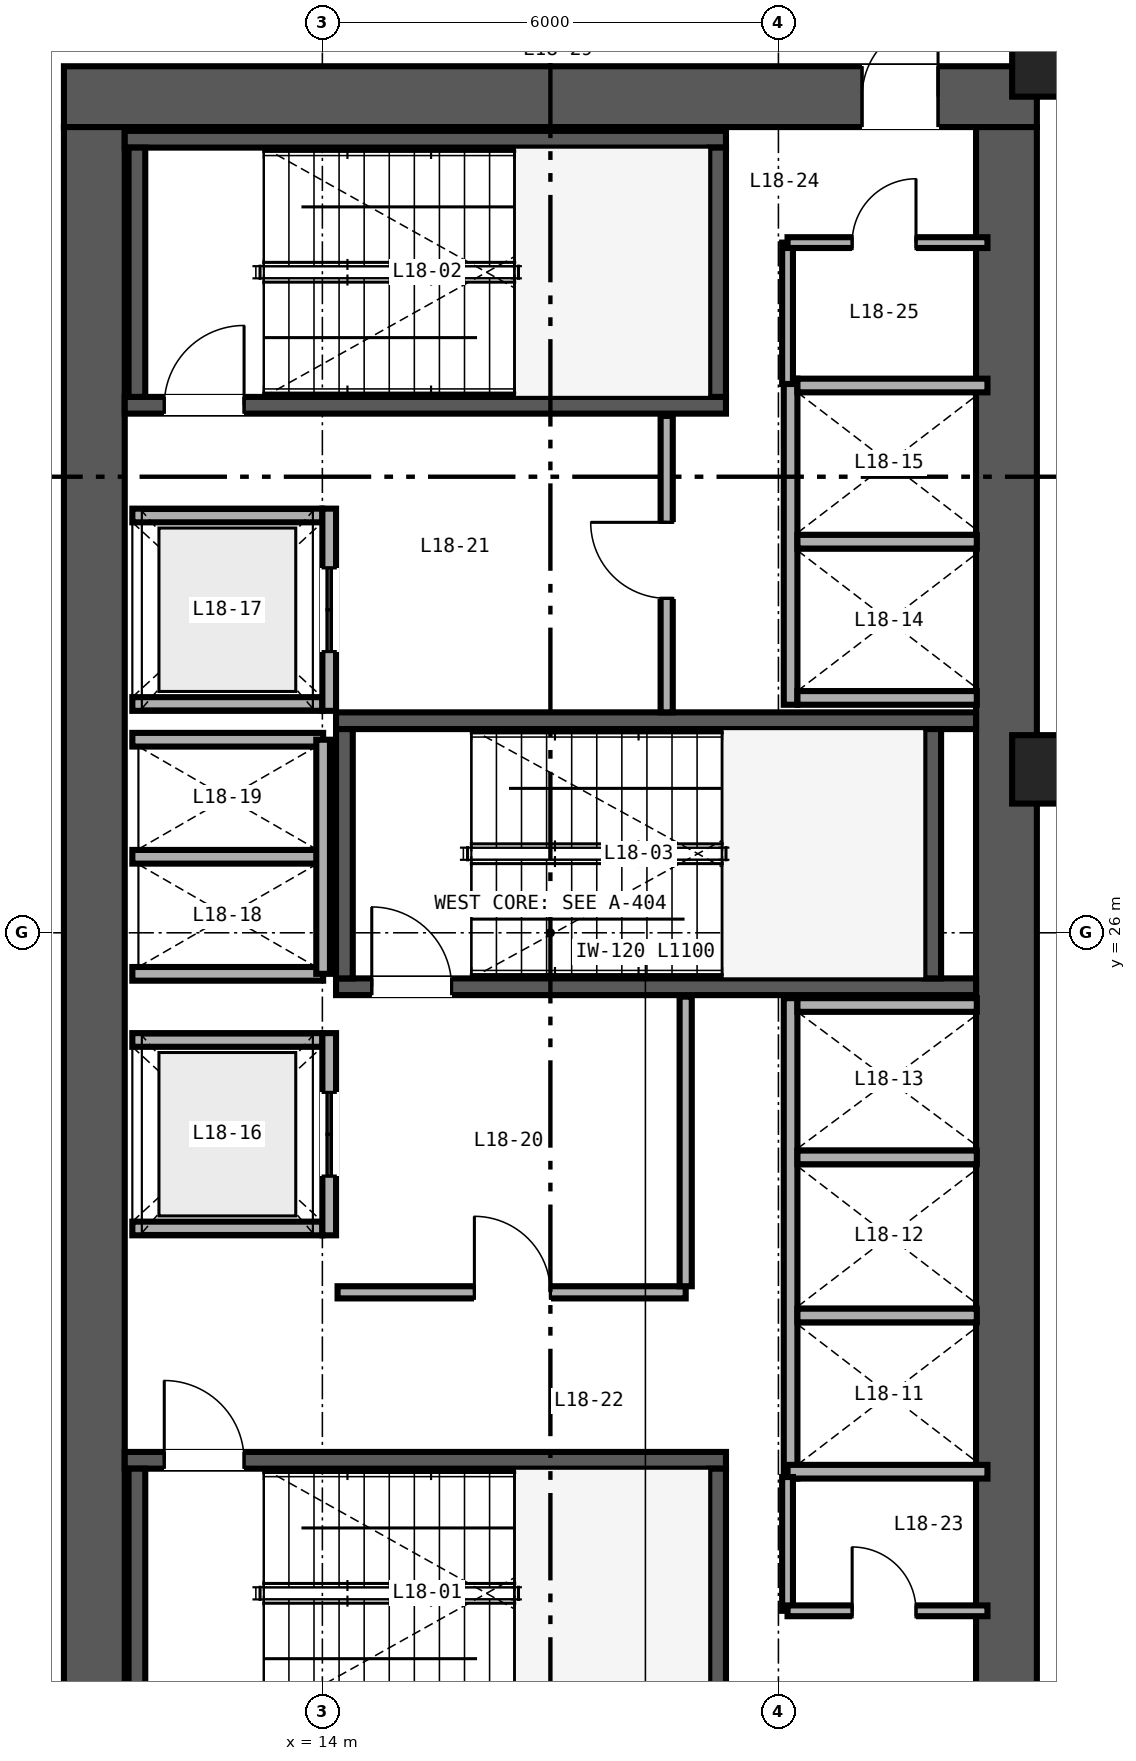
"""IFC4 building model, lengths in metres.
Left out: names, types, materials, properties, quantities, classifications, styles, units other than length and angle.
Written with IfcOpenShell. Run it as: python <this file> out.ifc"""

import sys

from ifc_helpers import new_model, si_unit, direction, frame, frame_2d, origin, origin_2d, place, context, subcontext, project, spatial, rectangle, hollow_rectangle, extrude, source, transform, mapped, element, fill, save


model = new_model("IFC4")
c1 = context("Model", 3, precision=1e-05, world=origin(), true_north=direction((0.0, 1.0)))
c2 = subcontext(c1, "Body", "Model", "MODEL_VIEW")
j1 = project(units=[si_unit("LENGTHUNIT", "METRE"), si_unit("PLANEANGLEUNIT", "RADIAN")], contexts=[c1])
p1 = place(None, origin())
s1 = spatial("IfcSite", under=j1, at=p1, CompositionType="ELEMENT")
p2 = place(p1, origin())
s2 = spatial("IfcBuilding", under=s1, at=p2, CompositionType="ELEMENT")
p3 = place(p2, frame((0.0, 0.0, 74.4)))
s3 = spatial("IfcBuildingStorey", under=s2, at=p3, CompositionType="ELEMENT", Elevation=74.4)
p4 = place(p3, frame((10.6, 37.0, 0.0), z_axis=(0.0, 0.0, 1.0), x_axis=(1.0, 0.0, 0.0)))
e1 = element("IfcWall", 1, at=p4, inside=s3, PredefinedType="SHEAR", context=c2, shape_type="SweptSolid", body=[
    extrude(rectangle(XDim=12.8, YDim=0.8, at=frame_2d((6.4, 0.0))), origin(), (0.0, 0.0, 1.0), 3.35),
])
p5 = place(p4, frame((10.5, 0.0, 0.0)))
e2 = element("IfcOpeningElement", 2, at=p5, cuts=e1, PredefinedType="OPENING", context=c2, shape_type="SweptSolid", body=[
    extrude(rectangle(XDim=1.0, YDim=2.15, at=frame_2d((0.5, 1.075))), frame((0.0, 0.41, 0.0), z_axis=(0.0, -1.0, 0.0), x_axis=(1.0, 0.0, 0.0)), (0.0, 0.0, 1.0), 0.82),
])
for number, where, z_axis, x_axis in (
    (3, (11.0, 15.4, 0.0), (0.0, 0.0, 1.0), (0.0, 1.0, 0.0)),
    (4, (23.0, 15.4, 0.0), (0.0, 0.0, 1.0), (0.0, 1.0, 0.0)),
):
    element("IfcWall", number, at=place(p3, frame(where, z_axis=z_axis, x_axis=x_axis)), inside=s3, PredefinedType="SHEAR", context=c2, shape_type="SweptSolid", body=[
        extrude(rectangle(XDim=21.2, YDim=0.8, at=frame_2d((10.6, 0.0))), origin(), (0.0, 0.0, 1.0), 3.35),
    ])
p6 = place(p3, frame((11.4, 19.06, 0.0), z_axis=(0.0, 0.0, 1.0), x_axis=(1.0, 0.0, 0.0)))
e5 = element("IfcWall", 5, at=p6, inside=s3, PredefinedType="SHEAR", context=c2, shape_type="SweptSolid", body=[
    extrude(rectangle(XDim=7.91, YDim=0.22, at=frame_2d((3.955, 0.0))), origin(), (0.0, 0.0, 1.0), 3.4),
])
p7 = place(p6, frame((0.52, 0.0, 0.0)))
e6 = element("IfcOpeningElement", 6, at=p7, cuts=e5, PredefinedType="OPENING", context=c2, shape_type="SweptSolid", body=[
    extrude(rectangle(XDim=1.05, YDim=2.15, at=frame_2d((0.525, 1.075))), frame((0.0, 0.12, 0.0), z_axis=(0.0, -1.0, 0.0), x_axis=(1.0, 0.0, 0.0)), (0.0, 0.0, 1.0), 0.24),
])
for number, where, z_axis, x_axis in (
    (7, (11.56, 15.67, 0.0), (0.0, 0.0, 1.0), (0.0, 1.0, 0.0)),
    (8, (19.2, 15.67, 0.0), (0.0, 0.0, 1.0), (0.0, 1.0, 0.0)),
):
    element("IfcWall", number, at=place(p3, frame(where, z_axis=z_axis, x_axis=x_axis)), inside=s3, PredefinedType="SHEAR", context=c2, shape_type="SweptSolid", body=[
        extrude(rectangle(XDim=3.28, YDim=0.22, at=frame_2d((1.64, 0.0))), origin(), (0.0, 0.0, 1.0), 3.4),
    ])
p8 = place(p3, frame((11.4, 32.94, 0.0), z_axis=(0.0, 0.0, 1.0), x_axis=(1.0, 0.0, 0.0)))
e9 = element("IfcWall", 9, at=p8, inside=s3, PredefinedType="SHEAR", context=c2, shape_type="SweptSolid", body=[
    extrude(rectangle(XDim=7.91, YDim=0.22, at=frame_2d((3.955, 0.0))), origin(), (0.0, 0.0, 1.0), 3.4),
])
p9 = place(p8, frame((0.52, 0.0, 0.0)))
e10 = element("IfcOpeningElement", 10, at=p9, cuts=e9, PredefinedType="OPENING", context=c2, shape_type="SweptSolid", body=[
    extrude(rectangle(XDim=1.05, YDim=2.15, at=frame_2d((0.525, 1.075))), frame((0.0, 0.12, 0.0), z_axis=(0.0, -1.0, 0.0), x_axis=(1.0, 0.0, 0.0)), (0.0, 0.0, 1.0), 0.24),
])
p10 = place(p3, frame((11.4, 36.44, 0.0), z_axis=(0.0, 0.0, 1.0), x_axis=(1.0, 0.0, 0.0)))
e11 = element("IfcWall", 11, at=p10, inside=s3, PredefinedType="SHEAR", context=c2, shape_type="SweptSolid", body=[
    extrude(rectangle(XDim=7.91, YDim=0.22, at=frame_2d((3.955, 0.0))), origin(), (0.0, 0.0, 1.0), 3.4),
])
for number, where, z_axis, x_axis in (
    (12, (11.56, 33.05, 0.0), (0.0, 0.0, 1.0), (0.0, 1.0, 0.0)),
    (13, (19.2, 33.05, 0.0), (0.0, 0.0, 1.0), (0.0, 1.0, 0.0)),
):
    element("IfcWall", number, at=place(p3, frame(where, z_axis=z_axis, x_axis=x_axis)), inside=s3, PredefinedType="SHEAR", context=c2, shape_type="SweptSolid", body=[
        extrude(rectangle(XDim=3.28, YDim=0.22, at=frame_2d((1.64, 0.0))), origin(), (0.0, 0.0, 1.0), 3.4),
    ])
p11 = place(p3, frame((14.18, 25.29, 0.0), z_axis=(0.0, 0.0, 1.0), x_axis=(1.0, 0.0, 0.0)))
e14 = element("IfcWall", 14, at=p11, inside=s3, PredefinedType="SHEAR", context=c2, shape_type="SweptSolid", body=[
    extrude(rectangle(XDim=8.42, YDim=0.22, at=frame_2d((4.21, 0.0))), origin(), (0.0, 0.0, 1.0), 3.4),
])
p12 = place(p11, frame((0.47, 0.0, 0.0)))
e15 = element("IfcOpeningElement", 15, at=p12, cuts=e14, PredefinedType="OPENING", context=c2, shape_type="SweptSolid", body=[
    extrude(rectangle(XDim=1.05, YDim=2.15, at=frame_2d((0.525, 1.075))), frame((0.0, 0.12, 0.0), z_axis=(0.0, -1.0, 0.0), x_axis=(1.0, 0.0, 0.0)), (0.0, 0.0, 1.0), 0.24),
])
p13 = place(p3, frame((14.18, 28.79, 0.0), z_axis=(0.0, 0.0, 1.0), x_axis=(1.0, 0.0, 0.0)))
e16 = element("IfcWall", 16, at=p13, inside=s3, PredefinedType="SHEAR", context=c2, shape_type="SweptSolid", body=[
    extrude(rectangle(XDim=8.42, YDim=0.22, at=frame_2d((4.21, 0.0))), origin(), (0.0, 0.0, 1.0), 3.4),
])
for number, where, z_axis, x_axis in (
    (17, (14.29, 25.4, 0.0), (0.0, 0.0, 1.0), (0.0, 1.0, 0.0)),
    (18, (22.03, 25.4, 0.0), (0.0, 0.0, 1.0), (0.0, 1.0, 0.0)),
):
    element("IfcWall", number, at=place(p3, frame(where, z_axis=z_axis, x_axis=x_axis)), inside=s3, PredefinedType="SHEAR", context=c2, shape_type="SweptSolid", body=[
        extrude(rectangle(XDim=3.28, YDim=0.22, at=frame_2d((1.64, 0.0))), origin(), (0.0, 0.0, 1.0), 3.4),
    ])
m1 = source(origin(), c2, "Body", "SweptSolid", [
    extrude(hollow_rectangle(XDim=0.85, YDim=0.9, WallThickness=0.04, at=origin_2d()), origin(), (0.0, 0.0, 1.0), 3.35),
])
for number, where, z_axis, x_axis in (
    (19, (23.5, 28.15, 0.0), (0.0, 0.0, 1.0), (1.0, 0.0, 0.0)),
    (20, (23.5, 37.45, 0.0), (0.0, 0.0, 1.0), (1.0, 0.0, 0.0)),
):
    element("IfcColumn", number, at=place(p3, frame(where, z_axis=z_axis, x_axis=x_axis)), inside=s3, PredefinedType="COLUMN", context=c2, shape_type="MappedRepresentation", body=[
        mapped(m1, transform((0.0, 0.0, 0.0), scale=1.0)),
    ])
p14 = place(p3, frame((20.16, 18.82, 0.0), z_axis=(0.0, 0.0, 1.0), x_axis=(0.0, 1.0, 0.0)))
e21 = element("IfcWall", 21, at=p14, inside=s3, PredefinedType="SOLIDWALL", context=c2, shape_type="SweptSolid", body=[
    extrude(rectangle(XDim=6.32, YDim=0.18, at=frame_2d((3.16, 0.0))), origin(), (0.0, 0.0, 1.0), 2.36),
])
p15 = place(p3, frame((20.12, 18.91, 0.0), z_axis=(0.0, 0.0, 1.0), x_axis=(1.0, 0.0, 0.0)))
e22 = element("IfcWall", 22, at=p15, inside=s3, PredefinedType="SOLIDWALL", context=c2, shape_type="SweptSolid", body=[
    extrude(rectangle(XDim=2.63, YDim=0.18, at=frame_2d((1.315, 0.0))), origin(), (0.0, 0.0, 1.0), 3.35),
])
p16 = place(p3, frame((20.25, 25.05, 0.0), z_axis=(0.0, 0.0, 1.0), x_axis=(1.0, 0.0, 0.0)))
e23 = element("IfcWall", 23, at=p16, inside=s3, PredefinedType="SOLIDWALL", context=c2, shape_type="SweptSolid", body=[
    extrude(rectangle(XDim=2.36, YDim=0.18, at=frame_2d((1.18, 0.0))), origin(), (0.0, 0.0, 1.0), 3.35),
])
p17 = place(p3, frame((20.25, 20.965, 0.0), z_axis=(0.0, 0.0, 1.0), x_axis=(1.0, 0.0, 0.0)))
e24 = element("IfcWall", 24, at=p17, inside=s3, PredefinedType="SOLIDWALL", context=c2, shape_type="SweptSolid", body=[
    extrude(rectangle(XDim=2.36, YDim=0.18, at=frame_2d((1.18, 0.0))), origin(), (0.0, 0.0, 1.0), 2.36),
])
p18 = place(p3, frame((20.25, 23.045, 0.0), z_axis=(0.0, 0.0, 1.0), x_axis=(1.0, 0.0, 0.0)))
e25 = element("IfcWall", 25, at=p18, inside=s3, PredefinedType="SOLIDWALL", context=c2, shape_type="SweptSolid", body=[
    extrude(rectangle(XDim=2.36, YDim=0.18, at=frame_2d((1.18, 0.0))), origin(), (0.0, 0.0, 1.0), 3.35),
])
p19 = place(p3, frame((20.16, 29.0, 0.0), z_axis=(0.0, 0.0, 1.0), x_axis=(0.0, 1.0, 0.0)))
e26 = element("IfcWall", 26, at=p19, inside=s3, PredefinedType="SOLIDWALL", context=c2, shape_type="SweptSolid", body=[
    extrude(rectangle(XDim=4.29, YDim=0.18, at=frame_2d((2.145, 0.0))), origin(), (0.0, 0.0, 1.0), 3.35),
])
p20 = place(p3, frame((20.25, 29.09, 0.0), z_axis=(0.0, 0.0, 1.0), x_axis=(1.0, 0.0, 0.0)))
e27 = element("IfcWall", 27, at=p20, inside=s3, PredefinedType="SOLIDWALL", context=c2, shape_type="SweptSolid", body=[
    extrude(rectangle(XDim=2.36, YDim=0.18, at=frame_2d((1.18, 0.0))), origin(), (0.0, 0.0, 1.0), 3.35),
])
p21 = place(p3, frame((20.25, 33.2, 0.0), z_axis=(0.0, 0.0, 1.0), x_axis=(1.0, 0.0, 0.0)))
e28 = element("IfcWall", 28, at=p21, inside=s3, PredefinedType="SOLIDWALL", context=c2, shape_type="SweptSolid", body=[
    extrude(rectangle(XDim=2.5, YDim=0.18, at=frame_2d((1.25, 0.0))), origin(), (0.0, 0.0, 1.0), 3.35),
])
p22 = place(p3, frame((20.25, 31.145, 0.0), z_axis=(0.0, 0.0, 1.0), x_axis=(1.0, 0.0, 0.0)))
e29 = element("IfcWall", 29, at=p22, inside=s3, PredefinedType="SOLIDWALL", context=c2, shape_type="SweptSolid", body=[
    extrude(rectangle(XDim=2.36, YDim=0.18, at=frame_2d((1.18, 0.0))), origin(), (0.0, 0.0, 1.0), 3.35),
])
for number, where, z_axis, x_axis in (
    (30, (11.5, 22.11, 0.0), (0.0, 0.0, 1.0), (1.0, 0.0, 0.0)),
    (31, (11.5, 24.59, 0.0), (0.0, 0.0, 1.0), (1.0, 0.0, 0.0)),
):
    element("IfcWall", number, at=place(p3, frame(where, z_axis=z_axis, x_axis=x_axis)), inside=s3, PredefinedType="SOLIDWALL", context=c2, shape_type="SweptSolid", body=[
        extrude(rectangle(XDim=2.5, YDim=0.18, at=frame_2d((1.25, 0.0))), origin(), (0.0, 0.0, 1.0), 3.35),
    ])
p23 = place(p3, frame((14.09, 22.02, 0.0), z_axis=(0.0, 0.0, 1.0), x_axis=(0.0, 1.0, 0.0)))
e32 = element("IfcWall", 32, at=p23, inside=s3, PredefinedType="SOLIDWALL", context=c2, shape_type="SweptSolid", body=[
    extrude(rectangle(XDim=2.66, YDim=0.18, at=frame_2d((1.33, 0.0))), origin(), (0.0, 0.0, 1.0), 3.35),
])
p24 = place(p23, frame((0.78, 0.0, 0.0)))
e33 = element("IfcOpeningElement", 33, at=p24, cuts=e32, PredefinedType="OPENING", context=c2, shape_type="SweptSolid", body=[
    extrude(rectangle(XDim=1.1, YDim=2.2, at=frame_2d((0.55, 1.1))), frame((0.0, 0.1, 0.0), z_axis=(0.0, -1.0, 0.0), x_axis=(1.0, 0.0, 0.0)), (0.0, 0.0, 1.0), 0.2),
])
for number, where, z_axis, x_axis in (
    (34, (11.5, 29.01, 0.0), (0.0, 0.0, 1.0), (1.0, 0.0, 0.0)),
    (35, (11.5, 31.49, 0.0), (0.0, 0.0, 1.0), (1.0, 0.0, 0.0)),
):
    element("IfcWall", number, at=place(p3, frame(where, z_axis=z_axis, x_axis=x_axis)), inside=s3, PredefinedType="SOLIDWALL", context=c2, shape_type="SweptSolid", body=[
        extrude(rectangle(XDim=2.5, YDim=0.18, at=frame_2d((1.25, 0.0))), origin(), (0.0, 0.0, 1.0), 3.35),
    ])
p25 = place(p3, frame((14.09, 28.92, 0.0), z_axis=(0.0, 0.0, 1.0), x_axis=(0.0, 1.0, 0.0)))
e36 = element("IfcWall", 36, at=p25, inside=s3, PredefinedType="SOLIDWALL", context=c2, shape_type="SweptSolid", body=[
    extrude(rectangle(XDim=2.66, YDim=0.18, at=frame_2d((1.33, 0.0))), origin(), (0.0, 0.0, 1.0), 3.35),
])
p26 = place(p25, frame((0.78, 0.0, 0.0)))
e37 = element("IfcOpeningElement", 37, at=p26, cuts=e36, PredefinedType="OPENING", context=c2, shape_type="SweptSolid", body=[
    extrude(rectangle(XDim=1.1, YDim=2.2, at=frame_2d((0.55, 1.1))), frame((0.0, 0.1, 0.0), z_axis=(0.0, -1.0, 0.0), x_axis=(1.0, 0.0, 0.0)), (0.0, 0.0, 1.0), 0.2),
])
for number, where, z_axis, x_axis in (
    (38, (11.5, 25.46, 0.0), (0.0, 0.0, 1.0), (1.0, 0.0, 0.0)),
    (39, (11.5, 27.0, 0.0), (0.0, 0.0, 1.0), (1.0, 0.0, 0.0)),
    (40, (11.5, 28.54, 0.0), (0.0, 0.0, 1.0), (1.0, 0.0, 0.0)),
):
    element("IfcWall", number, at=place(p3, frame(where, z_axis=z_axis, x_axis=x_axis)), inside=s3, PredefinedType="SOLIDWALL", context=c2, shape_type="SweptSolid", body=[
        extrude(rectangle(XDim=2.51, YDim=0.18, at=frame_2d((1.255, 0.0))), origin(), (0.0, 0.0, 1.0), 3.35),
    ])
p27 = place(p3, frame((14.01, 25.46, 0.0), z_axis=(0.0, 0.0, 1.0), x_axis=(0.0, 1.0, 0.0)))
e41 = element("IfcWall", 41, at=p27, inside=s3, PredefinedType="SOLIDWALL", context=c2, shape_type="SweptSolid", body=[
    extrude(rectangle(XDim=3.08, YDim=0.18, at=frame_2d((1.54, 0.0))), origin(), (0.0, 0.0, 1.0), 3.35),
])
p28 = place(p3, frame((14.2, 21.27, 0.0), z_axis=(0.0, 0.0, 1.0), x_axis=(1.0, 0.0, 0.0)))
e42 = element("IfcWall", 42, at=p28, inside=s3, PredefinedType="PARTITIONING", context=c2, shape_type="SweptSolid", body=[
    extrude(rectangle(XDim=4.58, YDim=0.16, at=frame_2d((2.29, 0.0))), origin(), (0.0, 0.0, 1.0), 3.35),
])
p29 = place(p28, frame((1.8, 0.0, 0.0)))
e43 = element("IfcOpeningElement", 43, at=p29, cuts=e42, PredefinedType="OPENING", context=c2, shape_type="SweptSolid", body=[
    extrude(rectangle(XDim=1.0, YDim=2.15, at=frame_2d((0.5, 1.075))), frame((0.0, 0.09, 0.0), z_axis=(0.0, -1.0, 0.0), x_axis=(1.0, 0.0, 0.0)), (0.0, 0.0, 1.0), 0.18),
])
p30 = place(p3, frame((18.78, 21.35, 0.0), z_axis=(0.0, 0.0, 1.0), x_axis=(0.0, 1.0, 0.0)))
e44 = element("IfcWall", 44, at=p30, inside=s3, PredefinedType="PARTITIONING", context=c2, shape_type="SweptSolid", body=[
    extrude(rectangle(XDim=3.81, YDim=0.16, at=frame_2d((1.905, 0.0))), origin(), (0.0, 0.0, 1.0), 3.35),
])
p31 = place(p3, frame((18.53, 28.9, 0.0), z_axis=(0.0, 0.0, 1.0), x_axis=(0.0, 1.0, 0.0)))
e45 = element("IfcWall", 45, at=p31, inside=s3, PredefinedType="PARTITIONING", context=c2, shape_type="SweptSolid", body=[
    extrude(rectangle(XDim=3.9, YDim=0.16, at=frame_2d((1.95, 0.0))), origin(), (0.0, 0.0, 1.0), 3.35),
])
p32 = place(p31, frame((1.5, 0.0, 0.0)))
e46 = element("IfcOpeningElement", 46, at=p32, cuts=e45, PredefinedType="OPENING", context=c2, shape_type="SweptSolid", body=[
    extrude(rectangle(XDim=1.0, YDim=2.15, at=frame_2d((0.5, 1.075))), frame((0.0, 0.09, 0.0), z_axis=(0.0, -1.0, 0.0), x_axis=(1.0, 0.0, 0.0)), (0.0, 0.0, 1.0), 0.18),
])
p33 = place(p3, frame((20.12, 17.08, 0.0), z_axis=(0.0, 0.0, 1.0), x_axis=(0.0, 1.0, 0.0)))
e47 = element("IfcWall", 47, at=p33, inside=s3, PredefinedType="PARTITIONING", context=c2, shape_type="SweptSolid", body=[
    extrude(rectangle(XDim=1.76, YDim=0.142, at=frame_2d((0.88, 0.0))), origin(), (0.0, 0.0, 1.0), 3.35),
])
p34 = place(p3, frame((20.12, 17.08, 0.0), z_axis=(0.0, 0.0, 1.0), x_axis=(1.0, 0.0, 0.0)))
e48 = element("IfcWall", 48, at=p34, inside=s3, PredefinedType="PARTITIONING", context=c2, shape_type="SweptSolid", body=[
    extrude(rectangle(XDim=2.63, YDim=0.142, at=frame_2d((1.315, 0.0))), origin(), (0.0, 0.0, 1.0), 3.35),
])
p35 = place(p34, frame((0.85, 0.0, 0.0)))
e49 = element("IfcOpeningElement", 49, at=p35, cuts=e48, PredefinedType="OPENING", context=c2, shape_type="SweptSolid", body=[
    extrude(rectangle(XDim=0.84, YDim=2.1, at=frame_2d((0.42, 1.05))), frame((0.0, 0.081, 0.0), z_axis=(0.0, -1.0, 0.0), x_axis=(1.0, 0.0, 0.0)), (0.0, 0.0, 1.0), 0.162),
])
p36 = place(p3, frame((20.12, 33.22, 0.0), z_axis=(0.0, 0.0, 1.0), x_axis=(0.0, 1.0, 0.0)))
e50 = element("IfcWall", 50, at=p36, inside=s3, PredefinedType="PARTITIONING", context=c2, shape_type="SweptSolid", body=[
    extrude(rectangle(XDim=1.86, YDim=0.142, at=frame_2d((0.93, 0.0))), origin(), (0.0, 0.0, 1.0), 3.35),
])
p37 = place(p3, frame((20.12, 35.08, 0.0), z_axis=(0.0, 0.0, 1.0), x_axis=(1.0, 0.0, 0.0)))
e51 = element("IfcWall", 51, at=p37, inside=s3, PredefinedType="PARTITIONING", context=c2, shape_type="SweptSolid", body=[
    extrude(rectangle(XDim=2.63, YDim=0.142, at=frame_2d((1.315, 0.0))), origin(), (0.0, 0.0, 1.0), 3.35),
])
p38 = place(p37, frame((0.85, 0.0, 0.0)))
e52 = element("IfcOpeningElement", 52, at=p38, cuts=e51, PredefinedType="OPENING", context=c2, shape_type="SweptSolid", body=[
    extrude(rectangle(XDim=0.84, YDim=2.1, at=frame_2d((0.42, 1.05))), frame((0.0, 0.081, 0.0), z_axis=(0.0, -1.0, 0.0), x_axis=(1.0, 0.0, 0.0)), (0.0, 0.0, 1.0), 0.162),
])
m2 = source(origin(), c2, "Body", "SweptSolid", [
    extrude(rectangle(XDim=1.05, YDim=2.15, at=frame_2d((0.525, 1.075))), frame((0.0, 0.025, 0.0), z_axis=(0.0, -1.0, 0.0), x_axis=(1.0, 0.0, 0.0)), (0.0, 0.0, 1.0), 0.05),
])
p39 = place(p7, origin())
e53 = element("IfcDoor", 53, at=p39, inside=s3, OperationType="SINGLE_SWING_LEFT", PredefinedType="DOOR", context=c2, shape_type="MappedRepresentation", body=[
    mapped(m2, transform((0.0, 0.0, 0.0), scale=1.0)),
])
fill(e6, e53)
p40 = place(p9, origin())
e54 = element("IfcDoor", 54, at=p40, inside=s3, OperationType="SINGLE_SWING_RIGHT", PredefinedType="DOOR", context=c2, shape_type="MappedRepresentation", body=[
    mapped(m2, transform((0.0, 0.0, 0.0), scale=1.0)),
])
fill(e10, e54)
p41 = place(p12, origin())
e55 = element("IfcDoor", 55, at=p41, inside=s3, OperationType="SINGLE_SWING_LEFT", PredefinedType="DOOR", context=c2, shape_type="MappedRepresentation", body=[
    mapped(m2, transform((0.0, 0.0, 0.0), scale=1.0)),
])
fill(e15, e55)
m3 = source(origin(), c2, "Body", "SweptSolid", [
    extrude(rectangle(XDim=1.1, YDim=2.2, at=frame_2d((0.55, 1.1))), frame((0.0, 0.025, 0.0), z_axis=(0.0, -1.0, 0.0), x_axis=(1.0, 0.0, 0.0)), (0.0, 0.0, 1.0), 0.05),
])
p42 = place(p24, origin())
e56 = element("IfcDoor", 56, at=p42, inside=s3, OperationType="DOUBLE_DOOR_SLIDING", PredefinedType="DOOR", context=c2, shape_type="MappedRepresentation", body=[
    mapped(m3, transform((0.0, 0.0, 0.0), scale=1.0)),
])
fill(e33, e56)
p43 = place(p26, origin())
e57 = element("IfcDoor", 57, at=p43, inside=s3, OperationType="DOUBLE_DOOR_SLIDING", PredefinedType="DOOR", context=c2, shape_type="MappedRepresentation", body=[
    mapped(m3, transform((0.0, 0.0, 0.0), scale=1.0)),
])
fill(e37, e57)
m4 = source(origin(), c2, "Body", "SweptSolid", [
    extrude(rectangle(XDim=1.0, YDim=2.15, at=frame_2d((0.5, 1.075))), frame((0.0, 0.025, 0.0), z_axis=(0.0, -1.0, 0.0), x_axis=(1.0, 0.0, 0.0)), (0.0, 0.0, 1.0), 0.05),
])
p44 = place(p29, origin())
e58 = element("IfcDoor", 58, at=p44, inside=s3, OperationType="SINGLE_SWING_LEFT", PredefinedType="DOOR", context=c2, shape_type="MappedRepresentation", body=[
    mapped(m4, transform((0.0, 0.0, 0.0), scale=1.0)),
])
fill(e43, e58)
p45 = place(p32, origin())
e59 = element("IfcDoor", 59, at=p45, inside=s3, OperationType="SINGLE_SWING_RIGHT", PredefinedType="DOOR", context=c2, shape_type="MappedRepresentation", body=[
    mapped(m4, transform((0.0, 0.0, 0.0), scale=1.0)),
])
fill(e46, e59)
m5 = source(origin(), c2, "Body", "SweptSolid", [
    extrude(rectangle(XDim=0.84, YDim=2.1, at=frame_2d((0.42, 1.05))), frame((0.0, 0.025, 0.0), z_axis=(0.0, -1.0, 0.0), x_axis=(1.0, 0.0, 0.0)), (0.0, 0.0, 1.0), 0.05),
])
p46 = place(p35, origin())
e60 = element("IfcDoor", 60, at=p46, inside=s3, OperationType="SINGLE_SWING_LEFT", PredefinedType="DOOR", context=c2, shape_type="MappedRepresentation", body=[
    mapped(m5, transform((0.0, 0.0, 0.0), scale=1.0)),
])
fill(e49, e60)
p47 = place(p38, origin())
e61 = element("IfcDoor", 61, at=p47, inside=s3, OperationType="SINGLE_SWING_RIGHT", PredefinedType="DOOR", context=c2, shape_type="MappedRepresentation", body=[
    mapped(m5, transform((0.0, 0.0, 0.0), scale=1.0)),
])
fill(e52, e61)
p48 = place(p5, origin())
e62 = element("IfcDoor", 62, at=p48, inside=s3, OperationType="SINGLE_SWING_RIGHT", PredefinedType="DOOR", context=c2, shape_type="MappedRepresentation", body=[
    mapped(m4, transform((0.0, 0.0, 0.0), scale=1.0)),
])
fill(e2, e62)
save(model, sys.argv[1])
